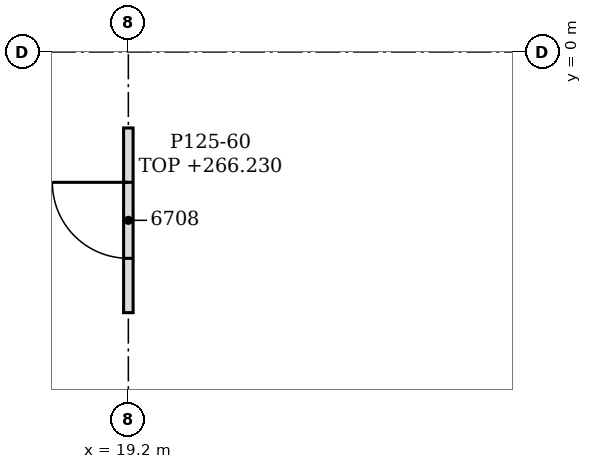
"""IFC4 building model, lengths in metres.
Left out: names, types, materials, properties, quantities, classifications, styles, units other than length and angle.
Written with IfcOpenShell. Run it as: python <this file> out.ifc"""

import sys

from ifc_helpers import new_model, si_unit, direction, frame, frame_2d, origin, place, context, subcontext, project, spatial, rectangle, extrude, element, fill, save


model = new_model("IFC4")
c1 = context("Model", 3, precision=1e-05, world=origin(), true_north=direction((0.0, 1.0)))
c2 = subcontext(c1, "Body", "Model", "MODEL_VIEW")
j1 = project(units=[si_unit("LENGTHUNIT", "METRE"), si_unit("PLANEANGLEUNIT", "RADIAN")], contexts=[c1])
p1 = place(None, origin())
s1 = spatial("IfcSite", under=j1, at=p1, CompositionType="ELEMENT")
p2 = place(p1, origin())
s2 = spatial("IfcBuilding", under=s1, at=p2, CompositionType="ELEMENT")
p3 = place(p2, frame((0.0, 0.0, 261.0)))
s3 = spatial("IfcBuildingStorey", under=s2, at=p3, CompositionType="ELEMENT", Elevation=261.0)
p4 = place(p3, frame((19.2, -3.43, 0.0), z_axis=(0.0, 0.0, 1.0), x_axis=(0.0, 1.0, 0.0)))
e1 = element("IfcWall", 1, at=p4, inside=s3, PredefinedType="PARTITIONING", context=c2, shape_type="SweptSolid", body=[
    extrude(rectangle(XDim=2.43, YDim=0.125, at=frame_2d((1.215, 0.0))), origin(), (0.0, 0.0, 1.0), 5.23),
])
p5 = place(p4, frame((0.715, 0.0, 0.0)))
e2 = element("IfcOpeningElement", 2, at=p5, cuts=e1, PredefinedType="OPENING", context=c2, shape_type="SweptSolid", body=[
    extrude(rectangle(XDim=1.0, YDim=2.1, at=frame_2d((0.5, 1.05))), frame((0.0, 0.073, 0.0), z_axis=(0.0, -1.0, 0.0), x_axis=(1.0, 0.0, 0.0)), (0.0, 0.0, 1.0), 0.145),
])
p6 = place(p5, origin())
e3 = element("IfcDoor", 3, at=p6, inside=s3, OperationType="SINGLE_SWING_RIGHT", PredefinedType="DOOR", context=c2, shape_type="SweptSolid", body=[
    extrude(rectangle(XDim=1.0, YDim=2.1, at=frame_2d((0.5, 1.05))), frame((0.0, 0.025, 0.0), z_axis=(0.0, -1.0, 0.0), x_axis=(1.0, 0.0, 0.0)), (0.0, 0.0, 1.0), 0.05),
])
fill(e2, e3)
save(model, sys.argv[1])
